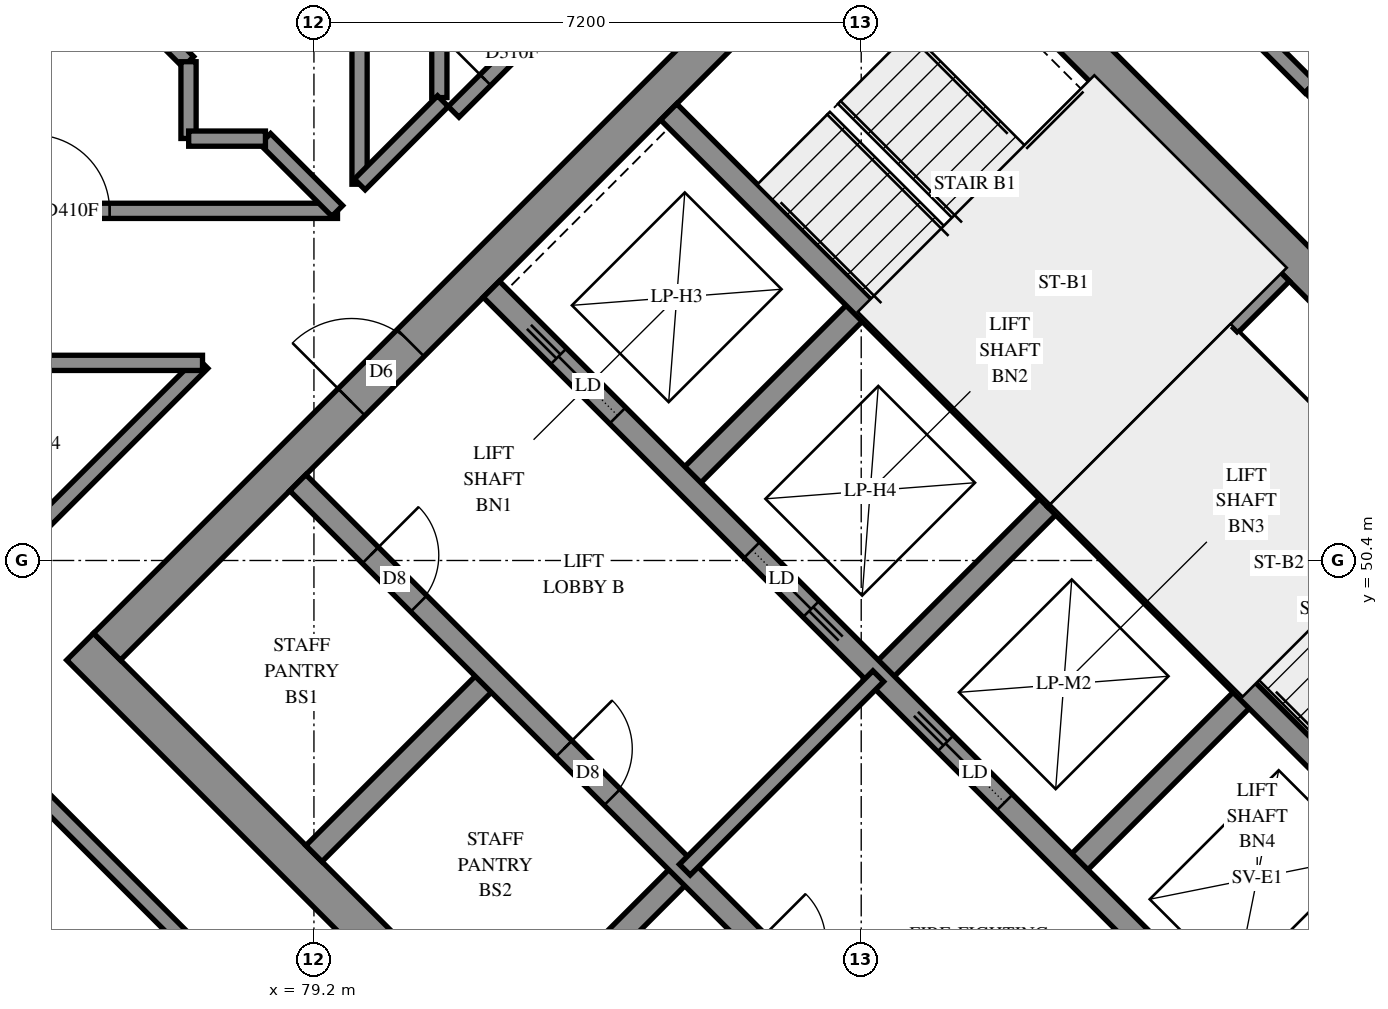
"""IFC4 building model, lengths in metres.
Left out: names, types, materials, properties, quantities, classifications, styles, units other than length and angle.
Written with IfcOpenShell. Run it as: python <this file> out.ifc"""

import sys

from ifc_helpers import new_model, si_unit, direction, frame, frame_2d, origin, place, context, subcontext, project, spatial, rectangle, extrude, element, fill, save


model = new_model("IFC4")
c1 = context("Model", 3, precision=1e-05, world=origin(), true_north=direction((0.0, 1.0)))
c2 = subcontext(c1, "Body", "Model", "MODEL_VIEW")
j1 = project(units=[si_unit("LENGTHUNIT", "METRE"), si_unit("PLANEANGLEUNIT", "RADIAN")], contexts=[c1])
p1 = place(None, origin())
s1 = spatial("IfcSite", under=j1, at=p1, CompositionType="ELEMENT")
p2 = place(p1, origin())
s2 = spatial("IfcBuilding", under=s1, at=p2, CompositionType="ELEMENT")
p3 = place(p2, frame((0.0, 0.0, 196.4)))
s3 = spatial("IfcBuildingStorey", under=s2, at=p3, CompositionType="ELEMENT", Elevation=196.4)
p4 = place(p3, frame((76.124, 49.267, -0.3), z_axis=(0.0, 0.0, 1.0), x_axis=(0.7071067812, -0.7071067812, 0.0)))
e1 = element("IfcWall", 1, at=p4, inside=s3, PredefinedType="SHEAR", context=c2, shape_type="SweptSolid", body=[
    extrude(rectangle(XDim=15.4, YDim=0.5, at=frame_2d((7.7, 0.0))), origin(), (0.0, 0.0, 1.0), 2.7),
])
p5 = place(p3, frame((86.66, 59.802, -0.3), z_axis=(0.0, 0.0, 1.0), x_axis=(0.7071067812, -0.7071067812, 0.0)))
e2 = element("IfcWall", 2, at=p5, inside=s3, PredefinedType="SHEAR", context=c2, shape_type="SweptSolid", body=[
    extrude(rectangle(XDim=15.4, YDim=0.5, at=frame_2d((7.7, 0.0))), origin(), (0.0, 0.0, 1.0), 2.7),
])
p6 = place(p5, frame((10.5, 0.0, 0.3)))
e3 = element("IfcOpeningElement", 3, at=p6, cuts=e2, PredefinedType="OPENING", context=c2, shape_type="SweptSolid", body=[
    extrude(rectangle(XDim=0.8, YDim=2.1, at=frame_2d((0.4, 1.05))), frame((0.0, 0.26, 0.0), z_axis=(0.0, -1.0, 0.0), x_axis=(1.0, 0.0, 0.0)), (0.0, 0.0, 1.0), 0.52),
])
p7 = place(p3, frame((76.478, 49.267, -0.3), z_axis=(0.0, 0.0, 1.0), x_axis=(0.7071067812, 0.7071067812, 0.0)))
e4 = element("IfcWall", 4, at=p7, inside=s3, PredefinedType="SHEAR", context=c2, shape_type="SweptSolid", body=[
    extrude(rectangle(XDim=14.4, YDim=0.5, at=frame_2d((7.2, 0.0))), origin(), (0.0, 0.0, 1.0), 2.7),
])
p8 = place(p7, frame((4.55, 0.0, 0.3)))
e5 = element("IfcOpeningElement", 5, at=p8, cuts=e4, PredefinedType="OPENING", context=c2, shape_type="SweptSolid", body=[
    extrude(rectangle(XDim=1.1, YDim=2.1, at=frame_2d((0.55, 1.05))), frame((0.0, 0.26, 0.0), z_axis=(0.0, -1.0, 0.0), x_axis=(1.0, 0.0, 0.0)), (0.0, 0.0, 1.0), 0.52),
])
p9 = place(p7, frame((11.35, 0.0, 0.3)))
e6 = element("IfcOpeningElement", 6, at=p9, cuts=e4, PredefinedType="OPENING", context=c2, shape_type="SweptSolid", body=[
    extrude(rectangle(XDim=1.1, YDim=2.1, at=frame_2d((0.55, 1.05))), frame((0.0, 0.26, 0.0), z_axis=(0.0, -1.0, 0.0), x_axis=(1.0, 0.0, 0.0)), (0.0, 0.0, 1.0), 0.52),
])
p10 = place(p3, frame((87.013, 38.731, -0.3), z_axis=(0.0, 0.0, 1.0), x_axis=(0.7071067812, 0.7071067812, 0.0)))
e7 = element("IfcWall", 7, at=p10, inside=s3, PredefinedType="SHEAR", context=c2, shape_type="SweptSolid", body=[
    extrude(rectangle(XDim=14.4, YDim=0.5, at=frame_2d((7.2, 0.0))), origin(), (0.0, 0.0, 1.0), 2.7),
])
p11 = place(p10, frame((4.55, 0.0, 0.3)))
e8 = element("IfcOpeningElement", 8, at=p11, cuts=e7, PredefinedType="OPENING", context=c2, shape_type="SweptSolid", body=[
    extrude(rectangle(XDim=1.1, YDim=2.1, at=frame_2d((0.55, 1.05))), frame((0.0, 0.26, 0.0), z_axis=(0.0, -1.0, 0.0), x_axis=(1.0, 0.0, 0.0)), (0.0, 0.0, 1.0), 0.52),
])
p12 = place(p10, frame((11.35, 0.0, 0.3)))
e9 = element("IfcOpeningElement", 9, at=p12, cuts=e7, PredefinedType="OPENING", context=c2, shape_type="SweptSolid", body=[
    extrude(rectangle(XDim=1.1, YDim=2.1, at=frame_2d((0.55, 1.05))), frame((0.0, 0.26, 0.0), z_axis=(0.0, -1.0, 0.0), x_axis=(1.0, 0.0, 0.0)), (0.0, 0.0, 1.0), 0.52),
])
for number, where, z_axis, x_axis in (
    (10, (79.2, 46.544, 0.0), (0.0, 0.0, 1.0), (0.707, 0.707, 0.0)),
    (11, (84.079, 51.423, 0.0), (0.0, 0.0, 1.0), (0.707, 0.707, 0.0)),
):
    element("IfcWall", number, at=place(p3, frame(where, z_axis=z_axis, x_axis=x_axis)), inside=s3, PredefinedType="SOLIDWALL", context=c2, shape_type="SweptSolid", body=[
        extrude(rectangle(XDim=3.3, YDim=0.3, at=frame_2d((1.65, 0.0))), origin(), (0.0, 0.0, 1.0), 3.1),
    ])
p13 = place(p3, frame((81.746, 43.999, 0.0), z_axis=(0.0, 0.0, 1.0), x_axis=(0.7071067812, 0.7071067812, 0.0)))
e12 = element("IfcWall", 12, at=p13, inside=s3, PredefinedType="SOLIDWALL", context=c2, shape_type="SweptSolid", body=[
    extrude(rectangle(XDim=3.3, YDim=0.3, at=frame_2d((1.65, 0.0))), origin(), (0.0, 0.0, 1.0), 3.1),
])
for number, where, z_axis, x_axis in (
    (13, (86.625, 48.878, 0.0), (0.0, 0.0, 1.0), (0.707, 0.707, 0.0)),
    (14, (89.17, 46.332, 0.0), (0.0, 0.0, 1.0), (0.707, 0.707, 0.0)),
):
    element("IfcWall", number, at=place(p3, frame(where, z_axis=z_axis, x_axis=x_axis)), inside=s3, PredefinedType="SOLIDWALL", context=c2, shape_type="SweptSolid", body=[
        extrude(rectangle(XDim=3.3, YDim=0.3, at=frame_2d((1.65, 0.0))), origin(), (0.0, 0.0, 1.0), 3.1),
    ])
p14 = place(p3, frame((78.988, 51.423, 0.0), z_axis=(0.0, 0.0, 1.0), x_axis=(0.7071067812, -0.7071067812, 0.0)))
e15 = element("IfcWall", 15, at=p14, inside=s3, PredefinedType="SOLIDWALL", context=c2, shape_type="SweptSolid", body=[
    extrude(rectangle(XDim=14.4, YDim=0.3, at=frame_2d((7.2, 0.0))), origin(), (0.0, 0.0, 1.0), 3.1),
])
p15 = place(p14, frame((1.35, 0.0, 0.0)))
e16 = element("IfcOpeningElement", 16, at=p15, cuts=e15, PredefinedType="OPENING", context=c2, shape_type="SweptSolid", body=[
    extrude(rectangle(XDim=0.9, YDim=2.1, at=frame_2d((0.45, 1.05))), frame((0.0, 0.16, 0.0), z_axis=(0.0, -1.0, 0.0), x_axis=(1.0, 0.0, 0.0)), (0.0, 0.0, 1.0), 0.32),
])
p16 = place(p14, frame((4.95, 0.0, 0.0)))
e17 = element("IfcOpeningElement", 17, at=p16, cuts=e15, PredefinedType="OPENING", context=c2, shape_type="SweptSolid", body=[
    extrude(rectangle(XDim=0.9, YDim=2.1, at=frame_2d((0.45, 1.05))), frame((0.0, 0.16, 0.0), z_axis=(0.0, -1.0, 0.0), x_axis=(1.0, 0.0, 0.0)), (0.0, 0.0, 1.0), 0.32),
])
p17 = place(p14, frame((8.55, 0.0, 0.0)))
e18 = element("IfcOpeningElement", 18, at=p17, cuts=e15, PredefinedType="OPENING", context=c2, shape_type="SweptSolid", body=[
    extrude(rectangle(XDim=0.9, YDim=2.1, at=frame_2d((0.45, 1.05))), frame((0.0, 0.16, 0.0), z_axis=(0.0, -1.0, 0.0), x_axis=(1.0, 0.0, 0.0)), (0.0, 0.0, 1.0), 0.32),
])
p18 = place(p14, frame((12.05, 0.0, 0.0)))
e19 = element("IfcOpeningElement", 19, at=p18, cuts=e15, PredefinedType="OPENING", context=c2, shape_type="SweptSolid", body=[
    extrude(rectangle(XDim=1.1, YDim=2.1, at=frame_2d((0.55, 1.05))), frame((0.0, 0.16, 0.0), z_axis=(0.0, -1.0, 0.0), x_axis=(1.0, 0.0, 0.0)), (0.0, 0.0, 1.0), 0.32),
])
p19 = place(p3, frame((81.534, 53.969, 0.0), z_axis=(0.0, 0.0, 1.0), x_axis=(0.707103309, -0.7071102534, 0.0)))
e20 = element("IfcWall", 20, at=p19, inside=s3, PredefinedType="SOLIDWALL", context=c2, shape_type="SweptSolid", body=[
    extrude(rectangle(XDim=14.4, YDim=0.3, at=frame_2d((7.2, 0.0))), origin(), (0.0, 0.0, 1.0), 3.1),
])
p20 = place(p19, frame((1.25, 0.0, 0.0)))
e21 = element("IfcOpeningElement", 21, at=p20, cuts=e20, PredefinedType="OPENING", context=c2, shape_type="SweptSolid", body=[
    extrude(rectangle(XDim=1.1, YDim=2.1, at=frame_2d((0.55, 1.05))), frame((0.0, 0.16, 0.0), z_axis=(0.0, -1.0, 0.0), x_axis=(1.0, 0.0, 0.0)), (0.0, 0.0, 1.0), 0.32),
])
p21 = place(p19, frame((4.85, 0.0, 0.0)))
e22 = element("IfcOpeningElement", 22, at=p21, cuts=e20, PredefinedType="OPENING", context=c2, shape_type="SweptSolid", body=[
    extrude(rectangle(XDim=1.1, YDim=2.1, at=frame_2d((0.55, 1.05))), frame((0.0, 0.16, 0.0), z_axis=(0.0, -1.0, 0.0), x_axis=(1.0, 0.0, 0.0)), (0.0, 0.0, 1.0), 0.32),
])
p22 = place(p19, frame((8.45, 0.0, 0.0)))
e23 = element("IfcOpeningElement", 23, at=p22, cuts=e20, PredefinedType="OPENING", context=c2, shape_type="SweptSolid", body=[
    extrude(rectangle(XDim=1.1, YDim=2.1, at=frame_2d((0.55, 1.05))), frame((0.0, 0.16, 0.0), z_axis=(0.0, -1.0, 0.0), x_axis=(1.0, 0.0, 0.0)), (0.0, 0.0, 1.0), 0.32),
])
p23 = place(p19, frame((12.05, 0.0, 0.0)))
e24 = element("IfcOpeningElement", 24, at=p23, cuts=e20, PredefinedType="OPENING", context=c2, shape_type="SweptSolid", body=[
    extrude(rectangle(XDim=1.1, YDim=2.1, at=frame_2d((0.55, 1.05))), frame((0.0, 0.16, 0.0), z_axis=(0.0, -1.0, 0.0), x_axis=(1.0, 0.0, 0.0)), (0.0, 0.0, 1.0), 0.32),
])
for number, where, z_axis, x_axis in (
    (25, (83.867, 56.302, 0.0), (0.0, 0.0, 1.0), (0.707, -0.707, 0.0)),
    (26, (88.958, 51.211, 0.0), (0.0, 0.0, 1.0), (0.707, -0.707, 0.0)),
):
    element("IfcWall", number, at=place(p3, frame(where, z_axis=z_axis, x_axis=x_axis)), inside=s3, PredefinedType="SOLIDWALL", context=c2, shape_type="SweptSolid", body=[
        extrude(rectangle(XDim=7.2, YDim=0.3, at=frame_2d((3.6, 0.0))), origin(), (0.0, 0.0, 1.0), 3.1),
    ])
p24 = place(p3, frame((88.958, 51.211, 0.0), z_axis=(0.0, 0.0, 1.0), x_axis=(0.7071067812, 0.7071067812, 0.0)))
e27 = element("IfcWall", 27, at=p24, inside=s3, PredefinedType="SOLIDWALL", context=c2, shape_type="SweptSolid", body=[
    extrude(rectangle(XDim=4.2, YDim=0.3, at=frame_2d((2.1, 0.0))), origin(), (0.0, 0.0, 1.0), 3.1),
])
p25 = place(p3, frame((91.313, 53.354, 0.0), z_axis=(0.0, 0.0, 1.0), x_axis=(0.7071147811, -0.7070987812, 0.0)))
e28 = element("IfcWall", 28, at=p25, inside=s3, PredefinedType="PARTITIONING", context=c2, shape_type="SweptSolid", body=[
    extrude(rectangle(XDim=6.25, YDim=0.15, at=frame_2d((3.125, 0.0))), origin(), (0.0, 0.0, 1.0), 3.1),
])
p26 = place(p3, frame((84.079, 46.332, 0.0), z_axis=(0.0, 0.0, 1.0), x_axis=(0.7071067812, 0.7071067812, 0.0)))
e29 = element("IfcWall", 29, at=p26, inside=s3, PredefinedType="PARTITIONING", context=c2, shape_type="SweptSolid", body=[
    extrude(rectangle(XDim=3.6, YDim=0.2, at=frame_2d((1.8, 0.0))), origin(), (0.0, 0.0, 1.0), 3.1),
])
p27 = place(p3, frame((81.037, 56.303, 0.0), z_axis=(0.0, 0.0, 1.0), x_axis=(0.7071067812, 0.7071067812, 0.0)))
e30 = element("IfcWall", 30, at=p27, inside=s3, PredefinedType="PARTITIONING", context=c2, shape_type="SweptSolid", body=[
    extrude(rectangle(XDim=8.2, YDim=0.2, at=frame_2d((4.1, 0.0))), origin(), (0.0, 0.0, 1.0), 3.1),
])
p28 = place(p27, frame((0.592, 0.0, 0.0)))
e31 = element("IfcOpeningElement", 31, at=p28, cuts=e30, PredefinedType="OPENING", context=c2, shape_type="SweptSolid", body=[
    extrude(rectangle(XDim=1.0, YDim=2.1, at=frame_2d((0.5, 1.05))), frame((0.0, 0.11, 0.0), z_axis=(0.0, -1.0, 0.0), x_axis=(1.0, 0.0, 0.0)), (0.0, 0.0, 1.0), 0.22),
])
p29 = place(p3, frame((73.999, 48.911, 0.0), z_axis=(0.0, 0.0, 1.0), x_axis=(0.7071067812, -0.7071067812, 0.0)))
e32 = element("IfcWall", 32, at=p29, inside=s3, PredefinedType="PARTITIONING", context=c2, shape_type="SweptSolid", body=[
    extrude(rectangle(XDim=5.745, YDim=0.2, at=frame_2d((2.872, 0.0))), origin(), (0.0, 0.0, 1.0), 3.1),
])
p30 = place(p29, frame((0.724, 0.0, 0.0)))
e33 = element("IfcOpeningElement", 33, at=p30, cuts=e32, PredefinedType="OPENING", context=c2, shape_type="SweptSolid", body=[
    extrude(rectangle(XDim=1.0, YDim=2.1, at=frame_2d((0.5, 1.05))), frame((0.0, 0.11, 0.0), z_axis=(0.0, -1.0, 0.0), x_axis=(1.0, 0.0, 0.0)), (0.0, 0.0, 1.0), 0.22),
])
p31 = place(p3, frame((88.247, 60.683, 0.0), z_axis=(0.0, 0.0, 1.0), x_axis=(0.7071067812, -0.7071067812, 0.0)))
e34 = element("IfcWall", 34, at=p31, inside=s3, PredefinedType="PARTITIONING", context=c2, shape_type="SweptSolid", body=[
    extrude(rectangle(XDim=5.742, YDim=0.2, at=frame_2d((2.871, 0.0))), origin(), (0.0, 0.0, 1.0), 3.1),
])
p32 = place(p31, frame((4.069, 0.0, 0.0)))
e35 = element("IfcOpeningElement", 35, at=p32, cuts=e34, PredefinedType="OPENING", context=c2, shape_type="SweptSolid", body=[
    extrude(rectangle(XDim=0.9, YDim=2.1, at=frame_2d((0.45, 1.05))), frame((0.0, 0.11, 0.0), z_axis=(0.0, -1.0, 0.0), x_axis=(1.0, 0.0, 0.0)), (0.0, 0.0, 1.0), 0.22),
])
p33 = place(p3, frame((74.002, 55.0, 0.0), z_axis=(0.0, 0.0, 1.0), x_axis=(1.0, 0.0, 0.0)))
e36 = element("IfcWall", 36, at=p33, inside=s3, PredefinedType="PARTITIONING", context=c2, shape_type="SweptSolid", body=[
    extrude(rectangle(XDim=5.508, YDim=0.2, at=frame_2d((2.754, 0.0))), origin(), (0.0, 0.0, 1.0), 3.1),
])
p34 = place(p33, frame((1.51, 0.0, 0.0)))
e37 = element("IfcOpeningElement", 37, at=p34, cuts=e36, PredefinedType="OPENING", context=c2, shape_type="SweptSolid", body=[
    extrude(rectangle(XDim=1.0, YDim=2.1, at=frame_2d((0.5, 1.05))), frame((0.0, 0.11, 0.0), z_axis=(0.0, -1.0, 0.0), x_axis=(1.0, 0.0, 0.0)), (0.0, 0.0, 1.0), 0.22),
])
p35 = place(p3, frame((74.001, 49.267, 0.0), z_axis=(0.0, 0.0, 1.0), x_axis=(0.7071067812, 0.7071067812, 0.0)))
e38 = element("IfcWall", 38, at=p35, inside=s3, PredefinedType="PARTITIONING", context=c2, shape_type="SweptSolid", body=[
    extrude(rectangle(XDim=5.278, YDim=0.2, at=frame_2d((2.639, 0.0))), origin(), (0.0, 0.0, 1.0), 3.1),
])
p36 = place(p3, frame((74.197, 60.309, 0.0), z_axis=(0.0, 0.0, 1.0), x_axis=(0.7071067812, -0.7071067812, 0.0)))
e39 = element("IfcWall", 39, at=p36, inside=s3, PredefinedType="PARTITIONING", context=c2, shape_type="SweptSolid", body=[
    extrude(rectangle(XDim=4.738, YDim=0.2, at=frame_2d((2.369, 0.0))), origin(), (0.0, 0.0, 1.0), 3.1),
])
p37 = place(p3, frame((79.8, 55.35, 0.0), z_axis=(0.0, 0.0, 1.0), x_axis=(0.0, 1.0, 0.0)))
e40 = element("IfcWall", 40, at=p37, inside=s3, PredefinedType="PARTITIONING", context=c2, shape_type="SweptSolid", body=[
    extrude(rectangle(XDim=3.9, YDim=0.2, at=frame_2d((1.95, 0.0))), origin(), (0.0, 0.0, 1.0), 3.1),
])
p38 = place(p3, frame((74.002, 53.0, 0.0), z_axis=(0.0, 0.0, 1.0), x_axis=(1.0, 0.0, 0.0)))
e41 = element("IfcWall", 41, at=p38, inside=s3, PredefinedType="PARTITIONING", context=c2, shape_type="SweptSolid", body=[
    extrude(rectangle(XDim=3.732, YDim=0.2, at=frame_2d((1.866, 0.0))), origin(), (0.0, 0.0, 1.0), 3.1),
])
p39 = place(p38, frame((0.564, 0.0, 0.0)))
e42 = element("IfcOpeningElement", 42, at=p39, cuts=e41, PredefinedType="OPENING", context=c2, shape_type="SweptSolid", body=[
    extrude(rectangle(XDim=1.0, YDim=2.1, at=frame_2d((0.5, 1.05))), frame((0.0, 0.11, 0.0), z_axis=(0.0, -1.0, 0.0), x_axis=(1.0, 0.0, 0.0)), (0.0, 0.0, 1.0), 0.22),
])
p40 = place(p3, frame((80.85, 56.49, 0.0), z_axis=(0.0, 0.0, 1.0), x_axis=(0.0, 1.0, 0.0)))
e43 = element("IfcWall", 43, at=p40, inside=s3, PredefinedType="PARTITIONING", context=c2, shape_type="SweptSolid", body=[
    extrude(rectangle(XDim=1.886, YDim=0.2, at=frame_2d((0.943, 0.0))), origin(), (0.0, 0.0, 1.0), 3.1),
])
p41 = place(p3, frame((79.803, 55.347, 0.0), z_axis=(0.0, 0.0, 1.0), x_axis=(0.706460727, 0.7077522457, 0.0)))
e44 = element("IfcWall", 44, at=p41, inside=s3, PredefinedType="PARTITIONING", context=c2, shape_type="SweptSolid", body=[
    extrude(rectangle(XDim=1.549, YDim=0.2, at=frame_2d((0.774, 0.0))), origin(), (0.0, 0.0, 1.0), 3.1),
])
p42 = place(p3, frame((92.311, 56.627, 0.0), z_axis=(0.0, 0.0, 1.0), x_axis=(0.7077922938, -0.7064206033, 0.0)))
e45 = element("IfcWall", 45, at=p42, inside=s3, PredefinedType="PARTITIONING", context=c2, shape_type="SweptSolid", body=[
    extrude(rectangle(XDim=1.458, YDim=0.2, at=frame_2d((0.729, 0.0))), origin(), (0.0, 0.0, 1.0), 3.1),
])
p43 = place(p3, frame((78.559, 55.947, 0.0), z_axis=(0.0, 0.0, 1.0), x_axis=(0.7071067812, -0.7071067812, 0.0)))
e46 = element("IfcWall", 46, at=p43, inside=s3, PredefinedType="PARTITIONING", context=c2, shape_type="SweptSolid", body=[
    extrude(rectangle(XDim=1.341, YDim=0.2, at=frame_2d((0.67, 0.0))), origin(), (0.0, 0.0, 1.0), 3.1),
])
for number, where, z_axis, x_axis in (
    (47, (77.55, 55.952, 0.0), (0.0, 0.0, 1.0), (0.0, 1.0, 0.0)),
    (48, (77.552, 55.95, 0.0), (0.0, 0.0, 1.0), (1.0, 0.0, 0.0)),
):
    element("IfcWall", number, at=place(p3, frame(where, z_axis=z_axis, x_axis=x_axis)), inside=s3, PredefinedType="PARTITIONING", context=c2, shape_type="SweptSolid", body=[
        extrude(rectangle(XDim=1.01, YDim=0.2, at=frame_2d((0.505, 0.0))), origin(), (0.0, 0.0, 1.0), 3.1),
    ])
p44 = place(p8, origin())
e49 = element("IfcDoor", 49, at=p44, inside=s3, OperationType="DOUBLE_DOOR_SINGLE_SWING", PredefinedType="DOOR", context=c2, shape_type="SweptSolid", body=[
    extrude(rectangle(XDim=1.1, YDim=2.1, at=frame_2d((0.55, 1.05))), frame((0.0, 0.025, 0.0), z_axis=(0.0, -1.0, 0.0), x_axis=(1.0, 0.0, 0.0)), (0.0, 0.0, 1.0), 0.05),
])
fill(e5, e49)
p45 = place(p15, origin())
e50 = element("IfcDoor", 50, at=p45, inside=s3, OperationType="SINGLE_SWING_LEFT", PredefinedType="DOOR", context=c2, shape_type="SweptSolid", body=[
    extrude(rectangle(XDim=0.9, YDim=2.1, at=frame_2d((0.45, 1.05))), frame((0.0, 0.025, 0.0), z_axis=(0.0, -1.0, 0.0), x_axis=(1.0, 0.0, 0.0)), (0.0, 0.0, 1.0), 0.05),
])
fill(e16, e50)
p46 = place(p16, origin())
e51 = element("IfcDoor", 51, at=p46, inside=s3, OperationType="SINGLE_SWING_LEFT", PredefinedType="DOOR", context=c2, shape_type="SweptSolid", body=[
    extrude(rectangle(XDim=0.9, YDim=2.1, at=frame_2d((0.45, 1.05))), frame((0.0, 0.025, 0.0), z_axis=(0.0, -1.0, 0.0), x_axis=(1.0, 0.0, 0.0)), (0.0, 0.0, 1.0), 0.05),
])
fill(e17, e51)
p47 = place(p20, origin())
e52 = element("IfcDoor", 52, at=p47, inside=s3, OperationType="SLIDING_TO_LEFT", PredefinedType="DOOR", context=c2, shape_type="SweptSolid", body=[
    extrude(rectangle(XDim=1.1, YDim=2.1, at=frame_2d((0.55, 1.05))), frame((0.0, 0.025, 0.0), z_axis=(0.0, -1.0, 0.0), x_axis=(1.0, 0.0, 0.0)), (0.0, 0.0, 1.0), 0.05),
])
fill(e21, e52)
p48 = place(p21, origin())
e53 = element("IfcDoor", 53, at=p48, inside=s3, OperationType="SLIDING_TO_RIGHT", PredefinedType="DOOR", context=c2, shape_type="SweptSolid", body=[
    extrude(rectangle(XDim=1.1, YDim=2.1, at=frame_2d((0.55, 1.05))), frame((0.0, 0.025, 0.0), z_axis=(0.0, -1.0, 0.0), x_axis=(1.0, 0.0, 0.0)), (0.0, 0.0, 1.0), 0.05),
])
fill(e22, e53)
p49 = place(p22, origin())
e54 = element("IfcDoor", 54, at=p49, inside=s3, OperationType="SLIDING_TO_LEFT", PredefinedType="DOOR", context=c2, shape_type="SweptSolid", body=[
    extrude(rectangle(XDim=1.1, YDim=2.1, at=frame_2d((0.55, 1.05))), frame((0.0, 0.025, 0.0), z_axis=(0.0, -1.0, 0.0), x_axis=(1.0, 0.0, 0.0)), (0.0, 0.0, 1.0), 0.05),
])
fill(e23, e54)
p50 = place(p34, origin())
e55 = element("IfcDoor", 55, at=p50, inside=s3, OperationType="SINGLE_SWING_LEFT", PredefinedType="DOOR", context=c2, shape_type="SweptSolid", body=[
    extrude(rectangle(XDim=1.0, YDim=2.1, at=frame_2d((0.5, 1.05))), frame((0.0, 0.025, 0.0), z_axis=(0.0, -1.0, 0.0), x_axis=(1.0, 0.0, 0.0)), (0.0, 0.0, 1.0), 0.05),
])
fill(e37, e55)
p51 = place(p28, origin())
e56 = element("IfcDoor", 56, at=p51, inside=s3, OperationType="SINGLE_SWING_RIGHT", PredefinedType="DOOR", context=c2, shape_type="SweptSolid", body=[
    extrude(rectangle(XDim=1.0, YDim=2.1, at=frame_2d((0.5, 1.05))), frame((0.0, 0.025, 0.0), z_axis=(0.0, -1.0, 0.0), x_axis=(1.0, 0.0, 0.0)), (0.0, 0.0, 1.0), 0.05),
])
fill(e31, e56)
save(model, sys.argv[1])
